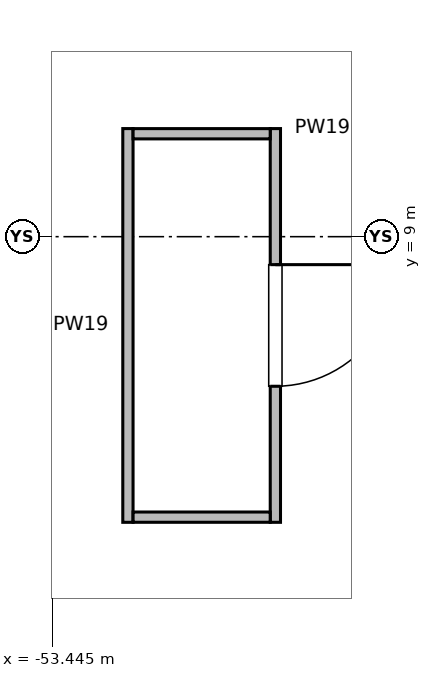
"""IFC4 building model, lengths in metres.
Left out: names, types, materials, properties, quantities, classifications, styles, units other than length and angle.
Written with IfcOpenShell. Run it as: python <this file> out.ifc"""

import sys

from ifc_helpers import new_model, si_unit, direction, frame, frame_2d, origin, place, context, subcontext, project, spatial, rectangle, extrude, element, fill, save


model = new_model("IFC4")
c1 = context("Model", 3, precision=1e-05, world=origin(), true_north=direction((0.0, 1.0)))
c2 = subcontext(c1, "Body", "Model", "MODEL_VIEW")
j1 = project(units=[si_unit("LENGTHUNIT", "METRE"), si_unit("PLANEANGLEUNIT", "RADIAN")], contexts=[c1])
p1 = place(None, origin())
s1 = spatial("IfcSite", under=j1, at=p1, CompositionType="ELEMENT")
p2 = place(p1, origin())
s2 = spatial("IfcBuilding", under=s1, at=p2, CompositionType="ELEMENT")
p3 = place(p2, frame((0.0, 0.0, -6.0)))
s3 = spatial("IfcBuildingStorey", under=s2, at=p3, CompositionType="ELEMENT", Elevation=-6.0)
p4 = place(p3, frame((-50.509, 10.422, 0.0), z_axis=(0.0, 0.0, 1.0), x_axis=(0.0, -1.0, 0.0)))
e1 = element("IfcWall", 1, at=p4, inside=s3, PredefinedType="PARTITIONING", context=c2, shape_type="SweptSolid", body=[
    extrude(rectangle(XDim=5.18, YDim=0.135, at=frame_2d((2.59, 0.0))), origin(), (0.0, 0.0, 1.0), 5.02),
])
p5 = place(p4, frame((1.79, 0.0, 0.0)))
e2 = element("IfcOpeningElement", 2, at=p5, cuts=e1, PredefinedType="OPENING", context=c2, shape_type="SweptSolid", body=[
    extrude(rectangle(XDim=1.6, YDim=2.25, at=frame_2d((0.8, 1.125))), frame((0.0, 0.077, 0.0), z_axis=(0.0, -1.0, 0.0), x_axis=(1.0, 0.0, 0.0)), (0.0, 0.0, 1.0), 0.155),
])
p6 = place(p3, frame((-52.449, 5.242, 0.0), z_axis=(0.0, 0.0, 1.0), x_axis=(0.0, 1.0, 0.0)))
e3 = element("IfcWall", 3, at=p6, inside=s3, PredefinedType="PARTITIONING", context=c2, shape_type="SweptSolid", body=[
    extrude(rectangle(XDim=5.18, YDim=0.135, at=frame_2d((2.59, 0.0))), origin(), (0.0, 0.0, 1.0), 5.02),
])
for number, where, z_axis, x_axis in (
    (4, (-52.381, 5.31, 0.0), (0.0, 0.0, 1.0), (1.0, 0.0, 0.0)),
    (5, (-52.381, 10.354, 0.0), (0.0, 0.0, 1.0), (1.0, 0.0, 0.0)),
):
    element("IfcWall", number, at=place(p3, frame(where, z_axis=z_axis, x_axis=x_axis)), inside=s3, PredefinedType="PARTITIONING", context=c2, shape_type="SweptSolid", body=[
        extrude(rectangle(XDim=1.804, YDim=0.135, at=frame_2d((0.902, 0.0))), origin(), (0.0, 0.0, 1.0), 5.02),
    ])
p7 = place(p5, origin())
e6 = element("IfcDoor", 6, at=p7, inside=s3, OperationType="SINGLE_SWING_LEFT", PredefinedType="DOOR", context=c2, shape_type="SweptSolid", body=[
    extrude(rectangle(XDim=1.6, YDim=2.25, at=frame_2d((0.8, 1.125))), frame((0.0, 0.025, 0.0), z_axis=(0.0, -1.0, 0.0), x_axis=(1.0, 0.0, 0.0)), (0.0, 0.0, 1.0), 0.05),
])
fill(e2, e6)
save(model, sys.argv[1])
